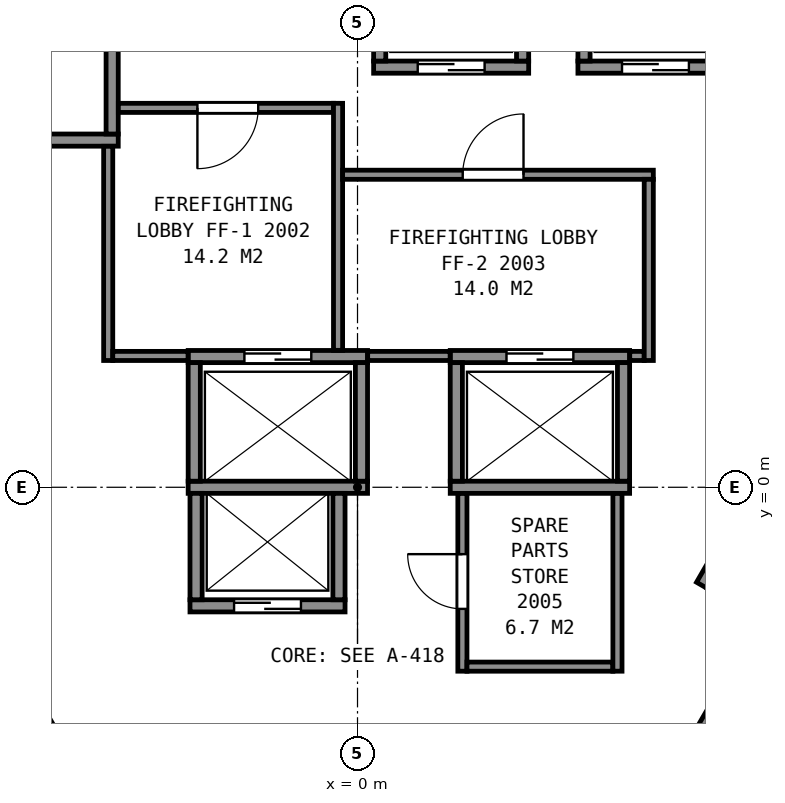
"""IFC4 building model, lengths in metres.
Left out: names, types, materials, properties, quantities, classifications, styles, units other than length and angle.
Written with IfcOpenShell. Run it as: python <this file> out.ifc"""

import sys

from ifc_helpers import new_model, si_unit, direction, frame, frame_2d, origin, place, context, subcontext, project, spatial, rectangle, extrude, element, fill, save


model = new_model("IFC4")
c1 = context("Model", 3, precision=1e-05, world=origin(), true_north=direction((0.0, 1.0)))
c2 = subcontext(c1, "Body", "Model", "MODEL_VIEW")
j1 = project(units=[si_unit("LENGTHUNIT", "METRE"), si_unit("PLANEANGLEUNIT", "RADIAN")], contexts=[c1])
p1 = place(None, origin())
s1 = spatial("IfcSite", under=j1, at=p1, CompositionType="ELEMENT")
p2 = place(p1, origin())
s2 = spatial("IfcBuilding", under=s1, at=p2, CompositionType="ELEMENT")
p3 = place(p2, frame((0.0, 0.0, 87.2)))
s3 = spatial("IfcBuildingStorey", under=s2, at=p3, CompositionType="ELEMENT", Elevation=87.2)
p4 = place(p3, frame((-2.755, -1.95, 0.0), z_axis=(0.0, 0.0, 1.0), x_axis=(1.0, 0.0, 0.0)))
e1 = element("IfcWall", 1, at=p4, inside=s3, PredefinedType="PARTITIONING", context=c2, shape_type="SweptSolid", body=[
    extrude(rectangle(XDim=2.55, YDim=0.2, at=frame_2d((1.275, 0.0))), origin(), (0.0, 0.0, 1.0), 5.6),
])
p5 = place(p4, frame((0.725, 0.0, 0.0)))
e2 = element("IfcOpeningElement", 2, at=p5, cuts=e1, PredefinedType="OPENING", context=c2, shape_type="SweptSolid", body=[
    extrude(rectangle(XDim=1.1, YDim=2.1, at=frame_2d((0.55, 1.05))), frame((0.0, 0.11, 0.0), z_axis=(0.0, -1.0, 0.0), x_axis=(1.0, 0.0, 0.0)), (0.0, 0.0, 1.0), 0.22),
])
p6 = place(p3, frame((-2.785, 0.0, 0.0), z_axis=(0.0, 0.0, 1.0), x_axis=(1.0, 0.0, 0.0)))
e3 = element("IfcWall", 3, at=p6, inside=s3, PredefinedType="PARTITIONING", context=c2, shape_type="SweptSolid", body=[
    extrude(rectangle(XDim=2.95, YDim=0.2, at=frame_2d((1.475, 0.0))), origin(), (0.0, 0.0, 1.0), 5.6),
])
p7 = place(p3, frame((1.525, 0.0, 0.0), z_axis=(0.0, 0.0, 1.0), x_axis=(1.0, 0.0, 0.0)))
e4 = element("IfcWall", 4, at=p7, inside=s3, PredefinedType="PARTITIONING", context=c2, shape_type="SweptSolid", body=[
    extrude(rectangle(XDim=2.95, YDim=0.2, at=frame_2d((1.475, 0.0))), origin(), (0.0, 0.0, 1.0), 5.6),
])
p8 = place(p3, frame((-2.785, 2.15, 0.0), z_axis=(0.0, 0.0, 1.0), x_axis=(1.0, 0.0, 0.0)))
e5 = element("IfcWall", 5, at=p8, inside=s3, PredefinedType="PARTITIONING", context=c2, shape_type="SweptSolid", body=[
    extrude(rectangle(XDim=2.95, YDim=0.2, at=frame_2d((1.475, 0.0))), origin(), (0.0, 0.0, 1.0), 5.6),
])
p9 = place(p8, frame((0.925, 0.0, 0.0)))
e6 = element("IfcOpeningElement", 6, at=p9, cuts=e5, PredefinedType="OPENING", context=c2, shape_type="SweptSolid", body=[
    extrude(rectangle(XDim=1.1, YDim=2.1, at=frame_2d((0.55, 1.05))), frame((0.0, 0.11, 0.0), z_axis=(0.0, -1.0, 0.0), x_axis=(1.0, 0.0, 0.0)), (0.0, 0.0, 1.0), 0.22),
])
p10 = place(p3, frame((1.525, 2.15, 0.0), z_axis=(0.0, 0.0, 1.0), x_axis=(1.0, 0.0, 0.0)))
e7 = element("IfcWall", 7, at=p10, inside=s3, PredefinedType="PARTITIONING", context=c2, shape_type="SweptSolid", body=[
    extrude(rectangle(XDim=2.95, YDim=0.2, at=frame_2d((1.475, 0.0))), origin(), (0.0, 0.0, 1.0), 5.6),
])
p11 = place(p10, frame((0.925, 0.0, 0.0)))
e8 = element("IfcOpeningElement", 8, at=p11, cuts=e7, PredefinedType="OPENING", context=c2, shape_type="SweptSolid", body=[
    extrude(rectangle(XDim=1.1, YDim=2.1, at=frame_2d((0.55, 1.05))), frame((0.0, 0.11, 0.0), z_axis=(0.0, -1.0, 0.0), x_axis=(1.0, 0.0, 0.0)), (0.0, 0.0, 1.0), 0.22),
])
p12 = place(p3, frame((-6.285, 5.71, 0.0), z_axis=(0.0, 0.0, 1.0), x_axis=(1.0, 0.0, 0.0)))
e9 = element("IfcWall", 9, at=p12, inside=s3, PredefinedType="PARTITIONING", context=c2, shape_type="SweptSolid", body=[
    extrude(rectangle(XDim=2.35, YDim=0.2, at=frame_2d((1.175, 0.0))), origin(), (0.0, 0.0, 1.0), 5.6),
])
p13 = place(p3, frame((0.265, 6.91, 0.0), z_axis=(0.0, 0.0, 1.0), x_axis=(1.0, 0.0, 0.0)))
e10 = element("IfcWall", 10, at=p13, inside=s3, PredefinedType="PARTITIONING", context=c2, shape_type="SweptSolid", body=[
    extrude(rectangle(XDim=2.55, YDim=0.2, at=frame_2d((1.275, 0.0))), origin(), (0.0, 0.0, 1.0), 5.6),
])
p14 = place(p13, frame((0.725, 0.0, 0.0)))
e11 = element("IfcOpeningElement", 11, at=p14, cuts=e10, PredefinedType="OPENING", context=c2, shape_type="SweptSolid", body=[
    extrude(rectangle(XDim=1.1, YDim=2.1, at=frame_2d((0.55, 1.05))), frame((0.0, 0.11, 0.0), z_axis=(0.0, -1.0, 0.0), x_axis=(1.0, 0.0, 0.0)), (0.0, 0.0, 1.0), 0.22),
])
p15 = place(p3, frame((3.625, 6.91, 0.0), z_axis=(0.0, 0.0, 1.0), x_axis=(1.0, 0.0, 0.0)))
e12 = element("IfcWall", 12, at=p15, inside=s3, PredefinedType="PARTITIONING", context=c2, shape_type="SweptSolid", body=[
    extrude(rectangle(XDim=2.55, YDim=0.2, at=frame_2d((1.275, 0.0))), origin(), (0.0, 0.0, 1.0), 5.6),
])
p16 = place(p15, frame((0.725, 0.0, 0.0)))
e13 = element("IfcOpeningElement", 13, at=p16, cuts=e12, PredefinedType="OPENING", context=c2, shape_type="SweptSolid", body=[
    extrude(rectangle(XDim=1.1, YDim=2.1, at=frame_2d((0.55, 1.05))), frame((0.0, 0.11, 0.0), z_axis=(0.0, -1.0, 0.0), x_axis=(1.0, 0.0, 0.0)), (0.0, 0.0, 1.0), 0.22),
])
p17 = place(p3, frame((5.527, -4.247, 0.0), z_axis=(0.0, 0.0, 1.0), x_axis=(0.499938297808, 0.866061024631, 0.0)))
e14 = element("IfcWall", 14, at=p17, inside=s3, PredefinedType="PARTITIONING", context=c2, shape_type="SweptSolid", body=[
    extrude(rectangle(XDim=2.35, YDim=0.2, at=frame_2d((1.175, 0.0))), origin(), (0.0, 0.0, 1.0), 5.6),
])
p18 = place(p17, frame((0.725, 0.0, 0.0)))
e15 = element("IfcOpeningElement", 15, at=p18, cuts=e14, PredefinedType="OPENING", context=c2, shape_type="SweptSolid", body=[
    extrude(rectangle(XDim=1.1, YDim=2.1, at=frame_2d((0.55, 1.05))), frame((0.0, 0.11, 0.0), z_axis=(0.0, -1.0, 0.0), x_axis=(1.0, 0.0, 0.0)), (0.0, 0.0, 1.0), 0.22),
])
p19 = place(p3, frame((5.663, -1.612, 0.0), z_axis=(0.0, 0.0, 1.0), x_axis=(0.49998122708, 0.866036242063, 0.0)))
e16 = element("IfcWall", 16, at=p19, inside=s3, PredefinedType="PARTITIONING", context=c2, shape_type="SweptSolid", body=[
    extrude(rectangle(XDim=4.9, YDim=0.2, at=frame_2d((2.45, 0.0))), origin(), (0.0, 0.0, 1.0), 5.6),
])
p20 = place(p3, frame((4.375, 0.1, 0.0), z_axis=(0.0, 0.0, 1.0), x_axis=(0.0, 1.0, 0.0)))
e17 = element("IfcWall", 17, at=p20, inside=s3, PredefinedType="PARTITIONING", context=c2, shape_type="SweptSolid", body=[
    extrude(rectangle(XDim=1.95, YDim=0.2, at=frame_2d((0.975, 0.0))), origin(), (0.0, 0.0, 1.0), 5.6),
])
for number, where, z_axis, x_axis in (
    (18, (3.725, 7.01, 0.0), (0.0, 0.0, 1.0), (0.0, 1.0, 0.0)),
    (19, (2.715, 7.01, 0.0), (0.0, 0.0, 1.0), (0.0, 1.0, 0.0)),
):
    element("IfcWall", number, at=place(p3, frame(where, z_axis=z_axis, x_axis=x_axis)), inside=s3, PredefinedType="PARTITIONING", context=c2, shape_type="SweptSolid", body=[
        extrude(rectangle(XDim=1.75, YDim=0.2, at=frame_2d((0.875, 0.0))), origin(), (0.0, 0.0, 1.0), 5.6),
    ])
p21 = place(p3, frame((1.625, 0.1, 0.0), z_axis=(0.0, 0.0, 1.0), x_axis=(0.0, 1.0, 0.0)))
e20 = element("IfcWall", 20, at=p21, inside=s3, PredefinedType="PARTITIONING", context=c2, shape_type="SweptSolid", body=[
    extrude(rectangle(XDim=1.95, YDim=0.2, at=frame_2d((0.975, 0.0))), origin(), (0.0, 0.0, 1.0), 5.6),
])
p22 = place(p3, frame((0.365, 7.01, 0.0), z_axis=(0.0, 0.0, 1.0), x_axis=(0.0, 1.0, 0.0)))
e21 = element("IfcWall", 21, at=p22, inside=s3, PredefinedType="PARTITIONING", context=c2, shape_type="SweptSolid", body=[
    extrude(rectangle(XDim=1.75, YDim=0.2, at=frame_2d((0.875, 0.0))), origin(), (0.0, 0.0, 1.0), 5.6),
])
p23 = place(p3, frame((0.065, 0.1, 0.0), z_axis=(0.0, 0.0, 1.0), x_axis=(0.0, 1.0, 0.0)))
e22 = element("IfcWall", 22, at=p23, inside=s3, PredefinedType="PARTITIONING", context=c2, shape_type="SweptSolid", body=[
    extrude(rectangle(XDim=1.95, YDim=0.2, at=frame_2d((0.975, 0.0))), origin(), (0.0, 0.0, 1.0), 5.6),
])
for number, where, z_axis, x_axis in (
    (23, (-0.305, -1.85, 0.0), (0.0, 0.0, 1.0), (0.0, 1.0, 0.0)),
    (24, (-2.655, -1.85, 0.0), (0.0, 0.0, 1.0), (0.0, 1.0, 0.0)),
):
    element("IfcWall", number, at=place(p3, frame(where, z_axis=z_axis, x_axis=x_axis)), inside=s3, PredefinedType="PARTITIONING", context=c2, shape_type="SweptSolid", body=[
        extrude(rectangle(XDim=1.75, YDim=0.2, at=frame_2d((0.875, 0.0))), origin(), (0.0, 0.0, 1.0), 5.6),
    ])
p24 = place(p3, frame((-2.685, 0.1, 0.0), z_axis=(0.0, 0.0, 1.0), x_axis=(0.0, 1.0, 0.0)))
e25 = element("IfcWall", 25, at=p24, inside=s3, PredefinedType="PARTITIONING", context=c2, shape_type="SweptSolid", body=[
    extrude(rectangle(XDim=1.95, YDim=0.2, at=frame_2d((0.975, 0.0))), origin(), (0.0, 0.0, 1.0), 5.6),
])
p25 = place(p3, frame((-4.035, 5.81, 0.0), z_axis=(0.0, 0.0, 1.0), x_axis=(0.0, 1.0, 0.0)))
e26 = element("IfcWall", 26, at=p25, inside=s3, PredefinedType="PARTITIONING", context=c2, shape_type="SweptSolid", body=[
    extrude(rectangle(XDim=1.75, YDim=0.2, at=frame_2d((0.875, 0.0))), origin(), (0.0, 0.0, 1.0), 5.6),
])
p26 = place(p3, frame((-13.664, 5.946, 0.0), z_axis=(0.0, 0.0, 1.0), x_axis=(0.499994327219, -0.866028678941, 0.0)))
e27 = element("IfcWall", 27, at=p26, inside=s3, PredefinedType="PARTITIONING", context=c2, shape_type="SweptSolid", body=[
    extrude(rectangle(XDim=23.968, YDim=0.2, at=frame_2d((11.984, 0.0))), origin(), (0.0, 0.0, 1.0), 5.35),
])
p27 = place(p3, frame((-4.091, -5.635, 0.0), z_axis=(0.0, 0.0, 1.0), x_axis=(-0.499948934428, 0.866054884499, 0.0)))
e28 = element("IfcWall", 28, at=p27, inside=s3, PredefinedType="PARTITIONING", context=c2, shape_type="SweptSolid", body=[
    extrude(rectangle(XDim=3.577, YDim=0.15, at=frame_2d((1.789, 0.0))), origin(), (0.0, 0.0, 1.0), 5.35),
])
p28 = place(p27, frame((2.377, 0.0, 0.0)))
e29 = element("IfcOpeningElement", 29, at=p28, cuts=e28, PredefinedType="OPENING", context=c2, shape_type="SweptSolid", body=[
    extrude(rectangle(XDim=0.9, YDim=2.1, at=frame_2d((0.45, 1.05))), frame((0.0, 0.085, 0.0), z_axis=(0.0, -1.0, 0.0), x_axis=(1.0, 0.0, 0.0)), (0.0, 0.0, 1.0), 0.17),
])
p29 = place(p27, frame((0.605, 0.0, 0.0)))
e30 = element("IfcOpeningElement", 30, at=p29, cuts=e28, PredefinedType="OPENING", context=c2, shape_type="SweptSolid", body=[
    extrude(rectangle(XDim=0.9, YDim=2.1, at=frame_2d((0.45, 1.05))), frame((0.0, 0.085, 0.0), z_axis=(0.0, -1.0, 0.0), x_axis=(1.0, 0.0, 0.0)), (0.0, 0.0, 1.0), 0.17),
])
p30 = place(p3, frame((-4.1, 2.085, 0.0), z_axis=(0.0, 0.0, 1.0), x_axis=(0.0, 1.0, 0.0)))
e31 = element("IfcWall", 31, at=p30, inside=s3, PredefinedType="PARTITIONING", context=c2, shape_type="SweptSolid", body=[
    extrude(rectangle(XDim=3.523, YDim=0.15, at=frame_2d((1.761, 0.0))), origin(), (0.0, 0.0, 1.0), 5.35),
])
p31 = place(p3, frame((-4.025, 2.16, 0.0), z_axis=(0.0, 0.0, 1.0), x_axis=(1.0, 0.0, 0.0)))
e32 = element("IfcWall", 32, at=p31, inside=s3, PredefinedType="PARTITIONING", context=c2, shape_type="SweptSolid", body=[
    extrude(rectangle(XDim=1.238, YDim=0.15, at=frame_2d((0.619, 0.0))), origin(), (0.0, 0.0, 1.0), 5.35),
])
p32 = place(p3, frame((-3.933, 6.24, 0.0), z_axis=(0.0, 0.0, 1.0), x_axis=(1.0, 0.0, 0.0)))
e33 = element("IfcWall", 33, at=p32, inside=s3, PredefinedType="PARTITIONING", context=c2, shape_type="SweptSolid", body=[
    extrude(rectangle(XDim=3.538, YDim=0.15, at=frame_2d((1.769, 0.0))), origin(), (0.0, 0.0, 1.0), 5.35),
])
p33 = place(p32, frame((1.3, 0.0, 0.0)))
e34 = element("IfcOpeningElement", 34, at=p33, cuts=e33, PredefinedType="OPENING", context=c2, shape_type="SweptSolid", body=[
    extrude(rectangle(XDim=1.0, YDim=2.1, at=frame_2d((0.5, 1.05))), frame((0.0, 0.085, 0.0), z_axis=(0.0, -1.0, 0.0), x_axis=(1.0, 0.0, 0.0)), (0.0, 0.0, 1.0), 0.17),
])
p34 = place(p3, frame((-0.32, 2.252, 0.0), z_axis=(0.0, 0.0, 1.0), x_axis=(0.0, 1.0, 0.0)))
e35 = element("IfcWall", 35, at=p34, inside=s3, PredefinedType="PARTITIONING", context=c2, shape_type="SweptSolid", body=[
    extrude(rectangle(XDim=4.063, YDim=0.15, at=frame_2d((2.031, 0.0))), origin(), (0.0, 0.0, 1.0), 5.35),
])
p35 = place(p3, frame((-0.245, 5.14, 0.0), z_axis=(0.0, 0.0, 1.0), x_axis=(1.0, 0.0, 0.0)))
e36 = element("IfcWall", 36, at=p35, inside=s3, PredefinedType="PARTITIONING", context=c2, shape_type="SweptSolid", body=[
    extrude(rectangle(XDim=5.11, YDim=0.15, at=frame_2d((2.555, 0.0))), origin(), (0.0, 0.0, 1.0), 5.35),
])
p36 = place(p35, frame((1.975, 0.0, 0.0)))
e37 = element("IfcOpeningElement", 37, at=p36, cuts=e36, PredefinedType="OPENING", context=c2, shape_type="SweptSolid", body=[
    extrude(rectangle(XDim=1.0, YDim=2.1, at=frame_2d((0.5, 1.05))), frame((0.0, 0.085, 0.0), z_axis=(0.0, -1.0, 0.0), x_axis=(1.0, 0.0, 0.0)), (0.0, 0.0, 1.0), 0.17),
])
p37 = place(p3, frame((0.167, 2.16, 0.0), z_axis=(0.0, 0.0, 1.0), x_axis=(1.0, 0.0, 0.0)))
e38 = element("IfcWall", 38, at=p37, inside=s3, PredefinedType="PARTITIONING", context=c2, shape_type="SweptSolid", body=[
    extrude(rectangle(XDim=1.356, YDim=0.15, at=frame_2d((0.678, 0.0))), origin(), (0.0, 0.0, 1.0), 5.35),
])
p38 = place(p3, frame((1.725, -0.102, 0.0), z_axis=(0.0, 0.0, 1.0), x_axis=(0.0, -1.0, 0.0)))
e39 = element("IfcWall", 39, at=p38, inside=s3, PredefinedType="PARTITIONING", context=c2, shape_type="SweptSolid", body=[
    extrude(rectangle(XDim=2.923, YDim=0.15, at=frame_2d((1.461, 0.0))), origin(), (0.0, 0.0, 1.0), 5.35),
])
p39 = place(p38, frame((0.998, 0.0, 0.0)))
e40 = element("IfcOpeningElement", 40, at=p39, cuts=e39, PredefinedType="OPENING", context=c2, shape_type="SweptSolid", body=[
    extrude(rectangle(XDim=0.9, YDim=2.1, at=frame_2d((0.45, 1.05))), frame((0.0, 0.085, 0.0), z_axis=(0.0, -1.0, 0.0), x_axis=(1.0, 0.0, 0.0)), (0.0, 0.0, 1.0), 0.17),
])
p40 = place(p3, frame((1.8, -2.95, 0.0), z_axis=(0.0, 0.0, 1.0), x_axis=(1.0, 0.0, 0.0)))
e41 = element("IfcWall", 41, at=p40, inside=s3, PredefinedType="PARTITIONING", context=c2, shape_type="SweptSolid", body=[
    extrude(rectangle(XDim=2.4, YDim=0.15, at=frame_2d((1.2, 0.0))), origin(), (0.0, 0.0, 1.0), 5.35),
])
p41 = place(p3, frame((4.275, -3.025, 0.0), z_axis=(0.0, 0.0, 1.0), x_axis=(0.0, 1.0, 0.0)))
e42 = element("IfcWall", 42, at=p41, inside=s3, PredefinedType="PARTITIONING", context=c2, shape_type="SweptSolid", body=[
    extrude(rectangle(XDim=2.923, YDim=0.15, at=frame_2d((1.461, 0.0))), origin(), (0.0, 0.0, 1.0), 5.35),
])
p42 = place(p3, frame((4.477, 2.16, 0.0), z_axis=(0.0, 0.0, 1.0), x_axis=(1.0, 0.0, 0.0)))
e43 = element("IfcWall", 43, at=p42, inside=s3, PredefinedType="PARTITIONING", context=c2, shape_type="SweptSolid", body=[
    extrude(rectangle(XDim=0.238, YDim=0.15, at=frame_2d((0.119, 0.0))), origin(), (0.0, 0.0, 1.0), 5.35),
])
p43 = place(p3, frame((4.79, 2.085, 0.0), z_axis=(0.0, 0.0, 1.0), x_axis=(0.0, 1.0, 0.0)))
e44 = element("IfcWall", 44, at=p43, inside=s3, PredefinedType="PARTITIONING", context=c2, shape_type="SweptSolid", body=[
    extrude(rectangle(XDim=2.98, YDim=0.15, at=frame_2d((1.49, 0.0))), origin(), (0.0, 0.0, 1.0), 5.35),
])
p44 = place(p3, frame((14.979, 3.956, 0.0), z_axis=(0.0, 0.0, 1.0), x_axis=(-0.499707610415, -0.866194149191, 0.0)))
e45 = element("IfcWall", 45, at=p44, inside=s3, PredefinedType="PARTITIONING", context=c2, shape_type="SweptSolid", body=[
    extrude(rectangle(XDim=21.833, YDim=0.125, at=frame_2d((10.917, 0.0))), origin(), (0.0, 0.0, 1.0), 4.262),
])
p45 = place(p44, frame((10.156, 0.0, 0.0)))
e46 = element("IfcOpeningElement", 46, at=p45, cuts=e45, PredefinedType="OPENING", context=c2, shape_type="SweptSolid", body=[
    extrude(rectangle(XDim=1.5, YDim=2.1, at=frame_2d((0.75, 1.05))), frame((0.0, 0.073, 0.0), z_axis=(0.0, -1.0, 0.0), x_axis=(1.0, 0.0, 0.0)), (0.0, 0.0, 1.0), 0.145),
])
p46 = place(p14, origin())
e47 = element("IfcDoor", 47, at=p46, inside=s3, OperationType="SLIDING_TO_LEFT", PredefinedType="DOOR", context=c2, shape_type="SweptSolid", body=[
    extrude(rectangle(XDim=1.1, YDim=2.1, at=frame_2d((0.55, 1.05))), frame((0.0, 0.025, 0.0), z_axis=(0.0, -1.0, 0.0), x_axis=(1.0, 0.0, 0.0)), (0.0, 0.0, 1.0), 0.05),
])
fill(e11, e47)
p47 = place(p5, origin())
e48 = element("IfcDoor", 48, at=p47, inside=s3, OperationType="SLIDING_TO_RIGHT", PredefinedType="DOOR", context=c2, shape_type="SweptSolid", body=[
    extrude(rectangle(XDim=1.1, YDim=2.1, at=frame_2d((0.55, 1.05))), frame((0.0, 0.025, 0.0), z_axis=(0.0, -1.0, 0.0), x_axis=(1.0, 0.0, 0.0)), (0.0, 0.0, 1.0), 0.05),
])
fill(e2, e48)
p48 = place(p16, origin())
e49 = element("IfcDoor", 49, at=p48, inside=s3, OperationType="SLIDING_TO_LEFT", PredefinedType="DOOR", context=c2, shape_type="SweptSolid", body=[
    extrude(rectangle(XDim=1.1, YDim=2.1, at=frame_2d((0.55, 1.05))), frame((0.0, 0.025, 0.0), z_axis=(0.0, -1.0, 0.0), x_axis=(1.0, 0.0, 0.0)), (0.0, 0.0, 1.0), 0.05),
])
fill(e13, e49)
p49 = place(p9, origin())
e50 = element("IfcDoor", 50, at=p49, inside=s3, OperationType="SLIDING_TO_LEFT", PredefinedType="DOOR", context=c2, shape_type="SweptSolid", body=[
    extrude(rectangle(XDim=1.1, YDim=2.1, at=frame_2d((0.55, 1.05))), frame((0.0, 0.025, 0.0), z_axis=(0.0, -1.0, 0.0), x_axis=(1.0, 0.0, 0.0)), (0.0, 0.0, 1.0), 0.05),
])
fill(e6, e50)
p50 = place(p11, origin())
e51 = element("IfcDoor", 51, at=p50, inside=s3, OperationType="SLIDING_TO_RIGHT", PredefinedType="DOOR", context=c2, shape_type="SweptSolid", body=[
    extrude(rectangle(XDim=1.1, YDim=2.1, at=frame_2d((0.55, 1.05))), frame((0.0, 0.025, 0.0), z_axis=(0.0, -1.0, 0.0), x_axis=(1.0, 0.0, 0.0)), (0.0, 0.0, 1.0), 0.05),
])
fill(e8, e51)
p51 = place(p33, origin())
e52 = element("IfcDoor", 52, at=p51, inside=s3, OperationType="SINGLE_SWING_LEFT", PredefinedType="DOOR", context=c2, shape_type="SweptSolid", body=[
    extrude(rectangle(XDim=1.0, YDim=2.1, at=frame_2d((0.5, 1.05))), frame((0.0, 0.025, 0.0), z_axis=(0.0, -1.0, 0.0), x_axis=(1.0, 0.0, 0.0)), (0.0, 0.0, 1.0), 0.05),
])
fill(e34, e52)
p52 = place(p36, origin())
e53 = element("IfcDoor", 53, at=p52, inside=s3, OperationType="SINGLE_SWING_RIGHT", PredefinedType="DOOR", context=c2, shape_type="SweptSolid", body=[
    extrude(rectangle(XDim=1.0, YDim=2.1, at=frame_2d((0.5, 1.05))), frame((0.0, 0.025, 0.0), z_axis=(0.0, -1.0, 0.0), x_axis=(1.0, 0.0, 0.0)), (0.0, 0.0, 1.0), 0.05),
])
fill(e37, e53)
p53 = place(p39, origin())
e54 = element("IfcDoor", 54, at=p53, inside=s3, OperationType="SINGLE_SWING_LEFT", PredefinedType="DOOR", context=c2, shape_type="SweptSolid", body=[
    extrude(rectangle(XDim=0.9, YDim=2.1, at=frame_2d((0.45, 1.05))), frame((0.0, 0.025, 0.0), z_axis=(0.0, -1.0, 0.0), x_axis=(1.0, 0.0, 0.0)), (0.0, 0.0, 1.0), 0.05),
])
fill(e40, e54)
save(model, sys.argv[1])
